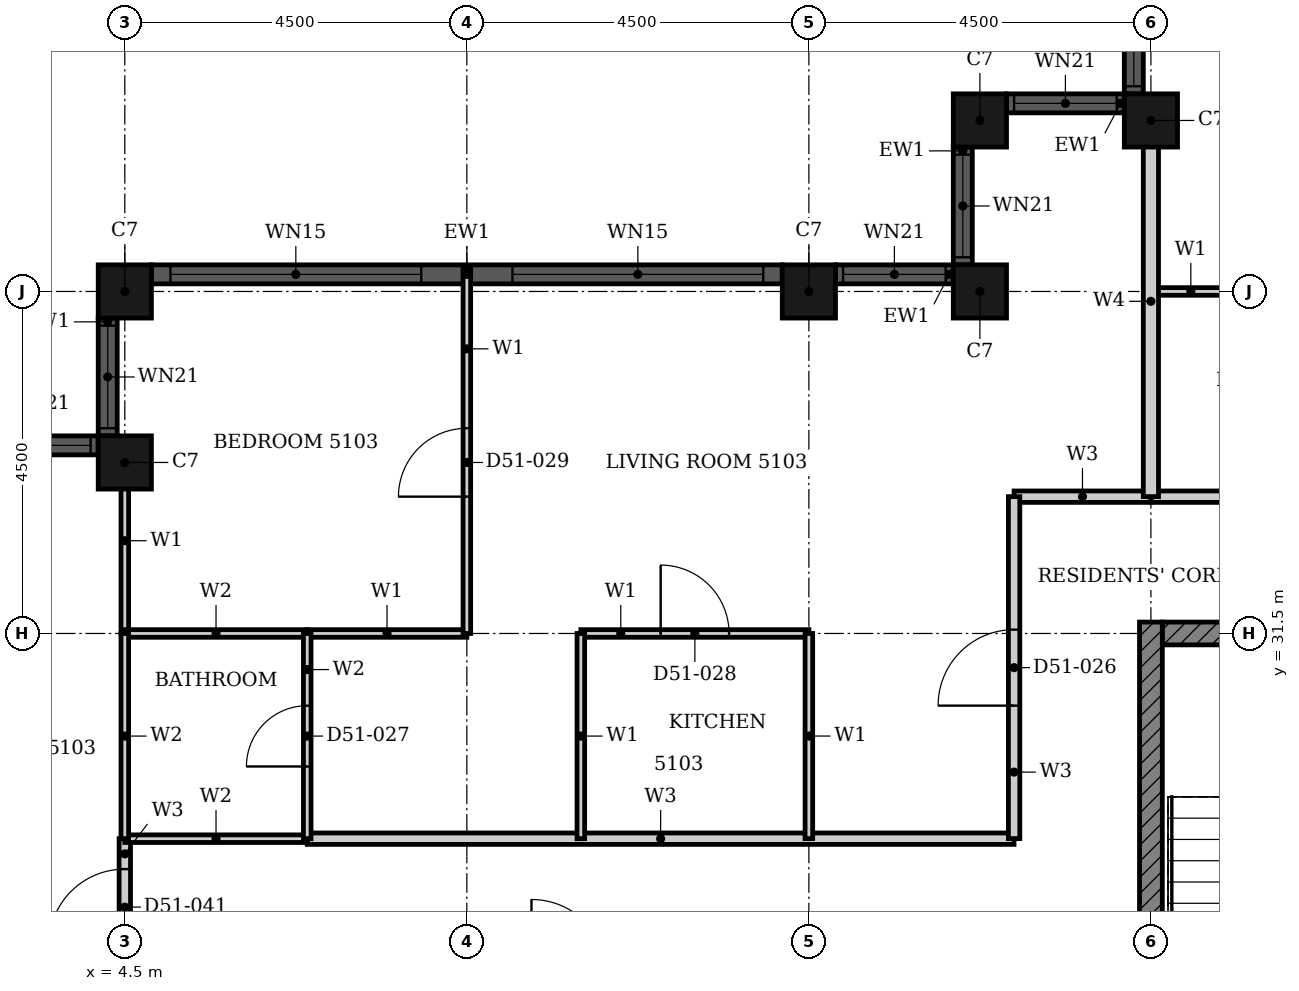
"""IFC4 building model, lengths in metres.
Left out: names, types, materials, properties, quantities, classifications, styles, units other than length and angle.
Written with IfcOpenShell. Run it as: python <this file> out.ifc"""

import sys

from ifc_helpers import new_model, si_unit, direction, frame, frame_2d, origin, origin_2d, place, context, subcontext, project, spatial, rectangle, hollow_rectangle, extrude, element, fill, save


model = new_model("IFC4")
c1 = context("Model", 3, precision=1e-05, world=origin(), true_north=direction((0.0, 1.0)))
c2 = subcontext(c1, "Body", "Model", "MODEL_VIEW")
j1 = project(units=[si_unit("LENGTHUNIT", "METRE"), si_unit("PLANEANGLEUNIT", "RADIAN")], contexts=[c1])
p1 = place(None, origin())
s1 = spatial("IfcSite", under=j1, at=p1, CompositionType="ELEMENT")
p2 = place(p1, origin())
s2 = spatial("IfcBuilding", under=s1, at=p2, CompositionType="ELEMENT")
p3 = place(p2, frame((0.0, 0.0, 203.5)))
s3 = spatial("IfcBuildingStorey", under=s2, at=p3, CompositionType="ELEMENT", Elevation=203.5)
for number, where, z_axis, x_axis in (
    (1, (18.0, 38.25, 0.0), (0.0, 0.0, 1.0), (1.0, 0.0, 0.0)),
    (2, (15.75, 38.25, 0.0), (0.0, 0.0, 1.0), (1.0, 0.0, 0.0)),
    (3, (15.75, 36.0, 0.0), (0.0, 0.0, 1.0), (1.0, 0.0, 0.0)),
    (4, (13.5, 36.0, 0.0), (0.0, 0.0, 1.0), (1.0, 0.0, 0.0)),
    (5, (4.5, 36.0, 0.0), (0.0, 0.0, 1.0), (1.0, 0.0, 0.0)),
    (6, (4.5, 33.75, 0.0), (0.0, 0.0, 1.0), (1.0, 0.0, 0.0)),
):
    element("IfcColumn", number, at=place(p3, frame(where, z_axis=z_axis, x_axis=x_axis)), inside=s3, PredefinedType="COLUMN", context=c2, shape_type="SweptSolid", body=[
        extrude(hollow_rectangle(XDim=0.7, YDim=0.7, WallThickness=0.022, at=origin_2d()), origin(), (0.0, 0.0, 1.0), 3.7),
    ])
p4 = place(p3, frame((17.775, 40.15, 0.0), z_axis=(0.0, 0.0, 1.0), x_axis=(0.0, -1.0, 0.0)))
e7 = element("IfcWall", 7, at=p4, inside=s3, PredefinedType="SOLIDWALL", context=c2, shape_type="SweptSolid", body=[
    extrude(rectangle(XDim=1.55, YDim=0.25, at=frame_2d((0.775, 0.0))), origin(), (0.0, 0.0, 1.0), 3.7),
])
p5 = place(p4, frame((0.1, 0.0, 0.9)))
e8 = element("IfcOpeningElement", 8, at=p5, cuts=e7, PredefinedType="OPENING", context=c2, shape_type="SweptSolid", body=[
    extrude(rectangle(XDim=1.35, YDim=1.85, at=frame_2d((0.675, 0.925))), frame((0.0, 0.135, 0.0), z_axis=(0.0, -1.0, 0.0), x_axis=(1.0, 0.0, 0.0)), (0.0, 0.0, 1.0), 0.27),
])
p6 = place(p3, frame((17.65, 38.475, 0.0), z_axis=(0.0, 0.0, 1.0), x_axis=(-1.0, 0.0, 0.0)))
e9 = element("IfcWall", 9, at=p6, inside=s3, PredefinedType="SOLIDWALL", context=c2, shape_type="SweptSolid", body=[
    extrude(rectangle(XDim=1.55, YDim=0.25, at=frame_2d((0.775, 0.0))), origin(), (0.0, 0.0, 1.0), 3.7),
])
p7 = place(p6, frame((0.1, 0.0, 0.9)))
e10 = element("IfcOpeningElement", 10, at=p7, cuts=e9, PredefinedType="OPENING", context=c2, shape_type="SweptSolid", body=[
    extrude(rectangle(XDim=1.35, YDim=1.85, at=frame_2d((0.675, 0.925))), frame((0.0, 0.135, 0.0), z_axis=(0.0, -1.0, 0.0), x_axis=(1.0, 0.0, 0.0)), (0.0, 0.0, 1.0), 0.27),
])
p8 = place(p3, frame((15.525, 37.9, 0.0), z_axis=(0.0, 0.0, 1.0), x_axis=(0.0, -1.0, 0.0)))
e11 = element("IfcWall", 11, at=p8, inside=s3, PredefinedType="SOLIDWALL", context=c2, shape_type="SweptSolid", body=[
    extrude(rectangle(XDim=1.55, YDim=0.25, at=frame_2d((0.775, 0.0))), origin(), (0.0, 0.0, 1.0), 3.7),
])
p9 = place(p8, frame((0.1, 0.0, 0.9)))
e12 = element("IfcOpeningElement", 12, at=p9, cuts=e11, PredefinedType="OPENING", context=c2, shape_type="SweptSolid", body=[
    extrude(rectangle(XDim=1.35, YDim=1.85, at=frame_2d((0.675, 0.925))), frame((0.0, 0.135, 0.0), z_axis=(0.0, -1.0, 0.0), x_axis=(1.0, 0.0, 0.0)), (0.0, 0.0, 1.0), 0.27),
])
p10 = place(p3, frame((15.4, 36.225, 0.0), z_axis=(0.0, 0.0, 1.0), x_axis=(-1.0, 0.0, 0.0)))
e13 = element("IfcWall", 13, at=p10, inside=s3, PredefinedType="SOLIDWALL", context=c2, shape_type="SweptSolid", body=[
    extrude(rectangle(XDim=1.55, YDim=0.25, at=frame_2d((0.775, 0.0))), origin(), (0.0, 0.0, 1.0), 3.7),
])
p11 = place(p10, frame((0.1, 0.0, 0.9)))
e14 = element("IfcOpeningElement", 14, at=p11, cuts=e13, PredefinedType="OPENING", context=c2, shape_type="SweptSolid", body=[
    extrude(rectangle(XDim=1.35, YDim=1.85, at=frame_2d((0.675, 0.925))), frame((0.0, 0.135, 0.0), z_axis=(0.0, -1.0, 0.0), x_axis=(1.0, 0.0, 0.0)), (0.0, 0.0, 1.0), 0.27),
])
p12 = place(p3, frame((13.15, 36.225, 0.0), z_axis=(0.0, 0.0, 1.0), x_axis=(-1.0, 0.0, 0.0)))
e15 = element("IfcWall", 15, at=p12, inside=s3, PredefinedType="SOLIDWALL", context=c2, shape_type="SweptSolid", body=[
    extrude(rectangle(XDim=8.3, YDim=0.25, at=frame_2d((4.15, 0.0))), origin(), (0.0, 0.0, 1.0), 3.7),
])
p13 = place(p12, frame((0.25, 0.0, 0.45)))
e16 = element("IfcOpeningElement", 16, at=p13, cuts=e15, PredefinedType="OPENING", context=c2, shape_type="SweptSolid", body=[
    extrude(rectangle(XDim=3.3, YDim=2.3, at=frame_2d((1.65, 1.15))), frame((0.0, 0.135, 0.0), z_axis=(0.0, -1.0, 0.0), x_axis=(1.0, 0.0, 0.0)), (0.0, 0.0, 1.0), 0.27),
])
p14 = place(p12, frame((4.75, 0.0, 0.45)))
e17 = element("IfcOpeningElement", 17, at=p14, cuts=e15, PredefinedType="OPENING", context=c2, shape_type="SweptSolid", body=[
    extrude(rectangle(XDim=3.3, YDim=2.3, at=frame_2d((1.65, 1.15))), frame((0.0, 0.135, 0.0), z_axis=(0.0, -1.0, 0.0), x_axis=(1.0, 0.0, 0.0)), (0.0, 0.0, 1.0), 0.27),
])
p15 = place(p3, frame((4.275, 35.65, 0.0), z_axis=(0.0, 0.0, 1.0), x_axis=(0.0, -1.0, 0.0)))
e18 = element("IfcWall", 18, at=p15, inside=s3, PredefinedType="SOLIDWALL", context=c2, shape_type="SweptSolid", body=[
    extrude(rectangle(XDim=1.55, YDim=0.25, at=frame_2d((0.775, 0.0))), origin(), (0.0, 0.0, 1.0), 3.7),
])
p16 = place(p15, frame((0.1, 0.0, 0.9)))
e19 = element("IfcOpeningElement", 19, at=p16, cuts=e18, PredefinedType="OPENING", context=c2, shape_type="SweptSolid", body=[
    extrude(rectangle(XDim=1.35, YDim=1.85, at=frame_2d((0.675, 0.925))), frame((0.0, 0.135, 0.0), z_axis=(0.0, -1.0, 0.0), x_axis=(1.0, 0.0, 0.0)), (0.0, 0.0, 1.0), 0.27),
])
p17 = place(p3, frame((4.15, 33.975, 0.0), z_axis=(0.0, 0.0, 1.0), x_axis=(-1.0, 0.0, 0.0)))
e20 = element("IfcWall", 20, at=p17, inside=s3, PredefinedType="SOLIDWALL", context=c2, shape_type="SweptSolid", body=[
    extrude(rectangle(XDim=1.55, YDim=0.25, at=frame_2d((0.775, 0.0))), origin(), (0.0, 0.0, 1.0), 3.7),
])
p18 = place(p17, frame((0.1, 0.0, 0.9)))
e21 = element("IfcOpeningElement", 21, at=p18, cuts=e20, PredefinedType="OPENING", context=c2, shape_type="SweptSolid", body=[
    extrude(rectangle(XDim=1.35, YDim=1.85, at=frame_2d((0.675, 0.925))), frame((0.0, 0.135, 0.0), z_axis=(0.0, -1.0, 0.0), x_axis=(1.0, 0.0, 0.0)), (0.0, 0.0, 1.0), 0.27),
])
p19 = place(p3, frame((18.15, 31.5, 0.0), z_axis=(0.0, 0.0, 1.0), x_axis=(1.0, 0.0, 0.0)))
e22 = element("IfcWall", 22, at=p19, inside=s3, PredefinedType="SHEAR", context=c2, shape_type="SweptSolid", body=[
    extrude(rectangle(XDim=9.368, YDim=0.3, at=frame_2d((4.684, 0.0))), origin(), (0.0, 0.0, 1.0), 3.4),
])
p20 = place(p19, frame((4.736, 0.0, 0.0)))
e23 = element("IfcOpeningElement", 23, at=p20, cuts=e22, PredefinedType="OPENING", context=c2, shape_type="SweptSolid", body=[
    extrude(rectangle(XDim=1.8, YDim=2.1, at=frame_2d((0.9, 1.05))), frame((0.0, 0.16, 0.0), z_axis=(0.0, -1.0, 0.0), x_axis=(1.0, 0.0, 0.0)), (0.0, 0.0, 1.0), 0.32),
])
p21 = place(p3, frame((18.0, 22.35, 0.0), z_axis=(0.0, 0.0, 1.0), x_axis=(0.0, 1.0, 0.0)))
e24 = element("IfcWall", 24, at=p21, inside=s3, PredefinedType="SHEAR", context=c2, shape_type="SweptSolid", body=[
    extrude(rectangle(XDim=9.3, YDim=0.3, at=frame_2d((4.65, 0.0))), origin(), (0.0, 0.0, 1.0), 3.4),
])
p22 = place(p3, frame((6.9, 28.8, 0.0), z_axis=(0.0, 0.0, 1.0), x_axis=(1.0, 0.0, 0.0)))
e25 = element("IfcWall", 25, at=p22, inside=s3, PredefinedType="PARTITIONING", context=c2, shape_type="SweptSolid", body=[
    extrude(rectangle(XDim=9.299, YDim=0.15, at=frame_2d((4.649, 0.0))), origin(), (0.0, 0.0, 1.0), 3.4),
])
p23 = place(p3, frame((18.0, 33.3, 0.0), z_axis=(0.0, 0.0, 1.0), x_axis=(1.0, 0.0, 0.0)))
e26 = element("IfcWall", 26, at=p23, inside=s3, PredefinedType="PARTITIONING", context=c2, shape_type="SweptSolid", body=[
    extrude(rectangle(XDim=6.6, YDim=0.15, at=frame_2d((3.3, 0.0))), origin(), (0.0, 0.0, 1.0), 3.4),
])
p24 = place(p23, frame((4.3, 0.0, 0.0)))
e27 = element("IfcOpeningElement", 27, at=p24, cuts=e26, PredefinedType="OPENING", context=c2, shape_type="SweptSolid", body=[
    extrude(rectangle(XDim=1.0, YDim=2.2, at=frame_2d((0.5, 1.1))), frame((0.0, 0.085, 0.0), z_axis=(0.0, -1.0, 0.0), x_axis=(1.0, 0.0, 0.0)), (0.0, 0.0, 1.0), 0.17),
])
p25 = place(p3, frame((16.2, 33.3, 0.0), z_axis=(0.0, 0.0, 1.0), x_axis=(1.0, 0.0, 0.0)))
e28 = element("IfcWall", 28, at=p25, inside=s3, PredefinedType="PARTITIONING", context=c2, shape_type="SweptSolid", body=[
    extrude(rectangle(XDim=1.799, YDim=0.15, at=frame_2d((0.899, 0.0))), origin(), (0.0, 0.0, 1.0), 3.4),
])
p26 = place(p3, frame((16.2, 28.801, 0.0), z_axis=(0.0, 0.0, 1.0), x_axis=(0.0, 1.0, 0.0)))
e29 = element("IfcWall", 29, at=p26, inside=s3, PredefinedType="PARTITIONING", context=c2, shape_type="SweptSolid", body=[
    extrude(rectangle(XDim=4.499, YDim=0.15, at=frame_2d((2.25, 0.0))), origin(), (0.0, 0.0, 1.0), 3.4),
])
p27 = place(p26, frame((1.75, 0.0, 0.0)))
e30 = element("IfcOpeningElement", 30, at=p27, cuts=e29, PredefinedType="OPENING", context=c2, shape_type="SweptSolid", body=[
    extrude(rectangle(XDim=1.0, YDim=2.2, at=frame_2d((0.5, 1.1))), frame((0.0, 0.085, 0.0), z_axis=(0.0, -1.0, 0.0), x_axis=(1.0, 0.0, 0.0)), (0.0, 0.0, 1.0), 0.17),
])
p28 = place(p3, frame((4.5, 27.0, 0.0), z_axis=(0.0, 0.0, 1.0), x_axis=(0.0, 1.0, 0.0)))
e31 = element("IfcWall", 31, at=p28, inside=s3, PredefinedType="PARTITIONING", context=c2, shape_type="SweptSolid", body=[
    extrude(rectangle(XDim=1.8, YDim=0.15, at=frame_2d((0.9, 0.0))), origin(), (0.0, 0.0, 1.0), 3.4),
])
p29 = place(p28, frame((0.4, 0.0, 0.0)))
e32 = element("IfcOpeningElement", 32, at=p29, cuts=e31, PredefinedType="OPENING", context=c2, shape_type="SweptSolid", body=[
    extrude(rectangle(XDim=1.0, YDim=2.1, at=frame_2d((0.5, 1.05))), frame((0.0, 0.085, 0.0), z_axis=(0.0, -1.0, 0.0), x_axis=(1.0, 0.0, 0.0)), (0.0, 0.0, 1.0), 0.17),
])
p30 = place(p3, frame((6.9, 31.5, 0.0), z_axis=(0.0, 0.0, 1.0), x_axis=(1.0, 0.0, 0.0)))
e33 = element("IfcWall", 33, at=p30, inside=s3, PredefinedType="PARTITIONING", context=c2, shape_type="SweptSolid", body=[
    extrude(rectangle(XDim=2.1, YDim=0.1, at=frame_2d((1.05, 0.0))), origin(), (0.0, 0.0, 1.0), 2.68),
])
p31 = place(p3, frame((10.5, 31.5, 0.0), z_axis=(0.0, 0.0, 1.0), x_axis=(1.0, 0.0, 0.0)))
e34 = element("IfcWall", 34, at=p31, inside=s3, PredefinedType="PARTITIONING", context=c2, shape_type="SweptSolid", body=[
    extrude(rectangle(XDim=3.0, YDim=0.1, at=frame_2d((1.5, 0.0))), origin(), (0.0, 0.0, 1.0), 2.68),
])
p32 = place(p31, frame((1.05, 0.0, 0.0)))
e35 = element("IfcOpeningElement", 35, at=p32, cuts=e34, PredefinedType="OPENING", context=c2, shape_type="SweptSolid", body=[
    extrude(rectangle(XDim=0.9, YDim=2.1, at=frame_2d((0.45, 1.05))), frame((0.0, 0.06, 0.0), z_axis=(0.0, -1.0, 0.0), x_axis=(1.0, 0.0, 0.0)), (0.0, 0.0, 1.0), 0.12),
])
p33 = place(p3, frame((18.0, 36.0, 0.0), z_axis=(0.0, 0.0, 1.0), x_axis=(1.0, 0.0, 0.0)))
e36 = element("IfcWall", 36, at=p33, inside=s3, PredefinedType="PARTITIONING", context=c2, shape_type="SweptSolid", body=[
    extrude(rectangle(XDim=3.0, YDim=0.1, at=frame_2d((1.5, 0.0))), origin(), (0.0, 0.0, 1.0), 3.4),
])
p34 = place(p33, frame((1.05, 0.0, 0.0)))
e37 = element("IfcOpeningElement", 37, at=p34, cuts=e36, PredefinedType="OPENING", context=c2, shape_type="SweptSolid", body=[
    extrude(rectangle(XDim=0.9, YDim=2.1, at=frame_2d((0.45, 1.05))), frame((0.0, 0.06, 0.0), z_axis=(0.0, -1.0, 0.0), x_axis=(1.0, 0.0, 0.0)), (0.0, 0.0, 1.0), 0.12),
])
p35 = place(p3, frame((10.5, 28.8, 0.0), z_axis=(0.0, 0.0, 1.0), x_axis=(0.0, 1.0, 0.0)))
e38 = element("IfcWall", 38, at=p35, inside=s3, PredefinedType="PARTITIONING", context=c2, shape_type="SweptSolid", body=[
    extrude(rectangle(XDim=2.7, YDim=0.1, at=frame_2d((1.35, 0.0))), origin(), (0.0, 0.0, 1.0), 3.4),
])
p36 = place(p3, frame((13.5, 28.801, 0.0), z_axis=(0.0, 0.0, 1.0), x_axis=(0.0, 1.0, 0.0)))
e39 = element("IfcWall", 39, at=p36, inside=s3, PredefinedType="PARTITIONING", context=c2, shape_type="SweptSolid", body=[
    extrude(rectangle(XDim=2.699, YDim=0.1, at=frame_2d((1.35, 0.0))), origin(), (0.0, 0.0, 1.0), 2.48),
])
p37 = place(p3, frame((4.5, 31.501, 0.0), z_axis=(0.0, 0.0, 1.0), x_axis=(0.0, 1.0, 0.0)))
e40 = element("IfcWall", 40, at=p37, inside=s3, PredefinedType="PARTITIONING", context=c2, shape_type="SweptSolid", body=[
    extrude(rectangle(XDim=2.439, YDim=0.1, at=frame_2d((1.219, 0.0))), origin(), (0.0, 0.0, 1.0), 3.4),
])
p38 = place(p3, frame((9.0, 31.5, 0.0), z_axis=(0.0, 0.0, 1.0), x_axis=(0.0, 1.0, 0.0)))
e41 = element("IfcWall", 41, at=p38, inside=s3, PredefinedType="PARTITIONING", context=c2, shape_type="SweptSolid", body=[
    extrude(rectangle(XDim=4.79, YDim=0.1, at=frame_2d((2.395, 0.0))), origin(), (0.0, 0.0, 1.0), 3.4),
])
p39 = place(p38, frame((1.8, 0.0, 0.0)))
e42 = element("IfcOpeningElement", 42, at=p39, cuts=e41, PredefinedType="OPENING", context=c2, shape_type="SweptSolid", body=[
    extrude(rectangle(XDim=0.9, YDim=2.1, at=frame_2d((0.45, 1.05))), frame((0.0, 0.06, 0.0), z_axis=(0.0, -1.0, 0.0), x_axis=(1.0, 0.0, 0.0)), (0.0, 0.0, 1.0), 0.12),
])
p40 = place(p3, frame((18.0, 33.301, 0.0), z_axis=(0.0, 0.0, 1.0), x_axis=(0.0, 1.0, 0.0)))
e43 = element("IfcWall", 43, at=p40, inside=s3, PredefinedType="PARTITIONING", context=c2, shape_type="SweptSolid", body=[
    extrude(rectangle(XDim=5.139, YDim=0.2, at=frame_2d((2.569, 0.0))), origin(), (0.0, 0.0, 1.0), 3.4),
])
p41 = place(p3, frame((4.5, 28.8, 0.0), z_axis=(0.0, 0.0, 1.0), x_axis=(1.0, 0.0, 0.0)))
e44 = element("IfcWall", 44, at=p41, inside=s3, PredefinedType="PARTITIONING", context=c2, shape_type="SweptSolid", body=[
    extrude(rectangle(XDim=2.4, YDim=0.1, at=frame_2d((1.2, 0.0))), origin(), (0.0, 0.0, 1.0), 3.4),
])
p42 = place(p3, frame((4.5, 31.5, 0.0), z_axis=(0.0, 0.0, 1.0), x_axis=(1.0, 0.0, 0.0)))
e45 = element("IfcWall", 45, at=p42, inside=s3, PredefinedType="PARTITIONING", context=c2, shape_type="SweptSolid", body=[
    extrude(rectangle(XDim=2.4, YDim=0.1, at=frame_2d((1.2, 0.0))), origin(), (0.0, 0.0, 1.0), 2.68),
])
p43 = place(p3, frame((4.5, 28.8, 0.0), z_axis=(0.0, 0.0, 1.0), x_axis=(0.0, 1.0, 0.0)))
e46 = element("IfcWall", 46, at=p43, inside=s3, PredefinedType="PARTITIONING", context=c2, shape_type="SweptSolid", body=[
    extrude(rectangle(XDim=2.7, YDim=0.1, at=frame_2d((1.35, 0.0))), origin(), (0.0, 0.0, 1.0), 3.4),
])
p44 = place(p3, frame((6.9, 28.8, 0.0), z_axis=(0.0, 0.0, 1.0), x_axis=(0.0, 1.0, 0.0)))
e47 = element("IfcWall", 47, at=p44, inside=s3, PredefinedType="PARTITIONING", context=c2, shape_type="SweptSolid", body=[
    extrude(rectangle(XDim=2.7, YDim=0.1, at=frame_2d((1.35, 0.0))), origin(), (0.0, 0.0, 1.0), 3.4),
])
p45 = place(p44, frame((0.95, 0.0, 0.0)))
e48 = element("IfcOpeningElement", 48, at=p45, cuts=e47, PredefinedType="OPENING", context=c2, shape_type="SweptSolid", body=[
    extrude(rectangle(XDim=0.8, YDim=2.1, at=frame_2d((0.4, 1.05))), frame((0.0, 0.06, 0.0), z_axis=(0.0, -1.0, 0.0), x_axis=(1.0, 0.0, 0.0)), (0.0, 0.0, 1.0), 0.12),
])
p46 = place(p5, origin())
e49 = element("IfcWindow", 49, at=p46, inside=s3, PartitioningType="SINGLE_PANEL", PredefinedType="WINDOW", context=c2, shape_type="SweptSolid", body=[
    extrude(rectangle(XDim=1.35, YDim=1.85, at=frame_2d((0.675, 0.925))), frame((0.0, 0.03, 0.0), z_axis=(0.0, -1.0, 0.0), x_axis=(1.0, 0.0, 0.0)), (0.0, 0.0, 1.0), 0.06),
])
fill(e8, e49)
p47 = place(p7, origin())
e50 = element("IfcWindow", 50, at=p47, inside=s3, PartitioningType="SINGLE_PANEL", PredefinedType="WINDOW", context=c2, shape_type="SweptSolid", body=[
    extrude(rectangle(XDim=1.35, YDim=1.85, at=frame_2d((0.675, 0.925))), frame((0.0, 0.03, 0.0), z_axis=(0.0, -1.0, 0.0), x_axis=(1.0, 0.0, 0.0)), (0.0, 0.0, 1.0), 0.06),
])
fill(e10, e50)
p48 = place(p9, origin())
e51 = element("IfcWindow", 51, at=p48, inside=s3, PartitioningType="SINGLE_PANEL", PredefinedType="WINDOW", context=c2, shape_type="SweptSolid", body=[
    extrude(rectangle(XDim=1.35, YDim=1.85, at=frame_2d((0.675, 0.925))), frame((0.0, 0.03, 0.0), z_axis=(0.0, -1.0, 0.0), x_axis=(1.0, 0.0, 0.0)), (0.0, 0.0, 1.0), 0.06),
])
fill(e12, e51)
p49 = place(p11, origin())
e52 = element("IfcWindow", 52, at=p49, inside=s3, PartitioningType="SINGLE_PANEL", PredefinedType="WINDOW", context=c2, shape_type="SweptSolid", body=[
    extrude(rectangle(XDim=1.35, YDim=1.85, at=frame_2d((0.675, 0.925))), frame((0.0, 0.03, 0.0), z_axis=(0.0, -1.0, 0.0), x_axis=(1.0, 0.0, 0.0)), (0.0, 0.0, 1.0), 0.06),
])
fill(e14, e52)
p50 = place(p13, origin())
e53 = element("IfcWindow", 53, at=p50, inside=s3, PartitioningType="SINGLE_PANEL", PredefinedType="WINDOW", context=c2, shape_type="SweptSolid", body=[
    extrude(rectangle(XDim=3.3, YDim=2.3, at=frame_2d((1.65, 1.15))), frame((0.0, 0.03, 0.0), z_axis=(0.0, -1.0, 0.0), x_axis=(1.0, 0.0, 0.0)), (0.0, 0.0, 1.0), 0.06),
])
fill(e16, e53)
p51 = place(p14, origin())
e54 = element("IfcWindow", 54, at=p51, inside=s3, PartitioningType="SINGLE_PANEL", PredefinedType="WINDOW", context=c2, shape_type="SweptSolid", body=[
    extrude(rectangle(XDim=3.3, YDim=2.3, at=frame_2d((1.65, 1.15))), frame((0.0, 0.03, 0.0), z_axis=(0.0, -1.0, 0.0), x_axis=(1.0, 0.0, 0.0)), (0.0, 0.0, 1.0), 0.06),
])
fill(e17, e54)
p52 = place(p16, origin())
e55 = element("IfcWindow", 55, at=p52, inside=s3, PartitioningType="SINGLE_PANEL", PredefinedType="WINDOW", context=c2, shape_type="SweptSolid", body=[
    extrude(rectangle(XDim=1.35, YDim=1.85, at=frame_2d((0.675, 0.925))), frame((0.0, 0.03, 0.0), z_axis=(0.0, -1.0, 0.0), x_axis=(1.0, 0.0, 0.0)), (0.0, 0.0, 1.0), 0.06),
])
fill(e19, e55)
p53 = place(p18, origin())
e56 = element("IfcWindow", 56, at=p53, inside=s3, PartitioningType="SINGLE_PANEL", PredefinedType="WINDOW", context=c2, shape_type="SweptSolid", body=[
    extrude(rectangle(XDim=1.35, YDim=1.85, at=frame_2d((0.675, 0.925))), frame((0.0, 0.03, 0.0), z_axis=(0.0, -1.0, 0.0), x_axis=(1.0, 0.0, 0.0)), (0.0, 0.0, 1.0), 0.06),
])
fill(e21, e56)
p54 = place(p27, origin())
e57 = element("IfcDoor", 57, at=p54, inside=s3, OperationType="SINGLE_SWING_RIGHT", PredefinedType="DOOR", context=c2, shape_type="SweptSolid", body=[
    extrude(rectangle(XDim=1.0, YDim=2.2, at=frame_2d((0.5, 1.1))), frame((0.0, 0.025, 0.0), z_axis=(0.0, -1.0, 0.0), x_axis=(1.0, 0.0, 0.0)), (0.0, 0.0, 1.0), 0.05),
])
fill(e30, e57)
p55 = place(p45, origin())
e58 = element("IfcDoor", 58, at=p55, inside=s3, OperationType="SINGLE_SWING_LEFT", PredefinedType="DOOR", context=c2, shape_type="SweptSolid", body=[
    extrude(rectangle(XDim=0.8, YDim=2.1, at=frame_2d((0.4, 1.05))), frame((0.0, 0.025, 0.0), z_axis=(0.0, -1.0, 0.0), x_axis=(1.0, 0.0, 0.0)), (0.0, 0.0, 1.0), 0.05),
])
fill(e48, e58)
p56 = place(p32, origin())
e59 = element("IfcDoor", 59, at=p56, inside=s3, OperationType="SINGLE_SWING_LEFT", PredefinedType="DOOR", context=c2, shape_type="SweptSolid", body=[
    extrude(rectangle(XDim=0.9, YDim=2.1, at=frame_2d((0.45, 1.05))), frame((0.0, 0.025, 0.0), z_axis=(0.0, -1.0, 0.0), x_axis=(1.0, 0.0, 0.0)), (0.0, 0.0, 1.0), 0.05),
])
fill(e35, e59)
p57 = place(p39, origin())
e60 = element("IfcDoor", 60, at=p57, inside=s3, OperationType="SINGLE_SWING_RIGHT", PredefinedType="DOOR", context=c2, shape_type="SweptSolid", body=[
    extrude(rectangle(XDim=0.9, YDim=2.1, at=frame_2d((0.45, 1.05))), frame((0.0, 0.025, 0.0), z_axis=(0.0, -1.0, 0.0), x_axis=(1.0, 0.0, 0.0)), (0.0, 0.0, 1.0), 0.05),
])
fill(e42, e60)
p58 = place(p29, origin())
e61 = element("IfcDoor", 61, at=p58, inside=s3, OperationType="SINGLE_SWING_LEFT", PredefinedType="DOOR", context=c2, shape_type="SweptSolid", body=[
    extrude(rectangle(XDim=1.0, YDim=2.1, at=frame_2d((0.5, 1.05))), frame((0.0, 0.025, 0.0), z_axis=(0.0, -1.0, 0.0), x_axis=(1.0, 0.0, 0.0)), (0.0, 0.0, 1.0), 0.05),
])
fill(e32, e61)
save(model, sys.argv[1])
